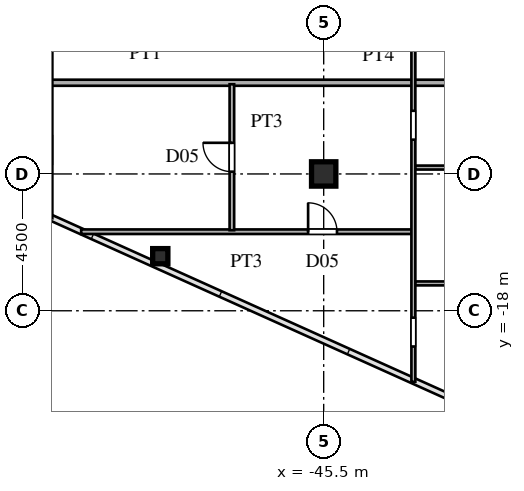
"""IFC4 building model, lengths in metres.
Left out: names, types, materials, properties, quantities, classifications, styles, units other than length and angle.
Written with IfcOpenShell. Run it as: python <this file> out.ifc"""

import sys

from ifc_helpers import new_model, si_unit, direction, frame, frame_2d, origin, origin_2d, place, context, subcontext, project, spatial, rectangle, hollow_rectangle, i_section, extrude, source, transform, mapped, element, fill, save


model = new_model("IFC4")
c1 = context("Model", 3, precision=1e-05, world=origin(), true_north=direction((0.0, 1.0)))
c2 = subcontext(c1, "Body", "Model", "MODEL_VIEW")
j1 = project(units=[si_unit("LENGTHUNIT", "METRE"), si_unit("PLANEANGLEUNIT", "RADIAN")], contexts=[c1])
p1 = place(None, origin())
s1 = spatial("IfcSite", under=j1, at=p1, CompositionType="ELEMENT")
p2 = place(p1, origin())
s2 = spatial("IfcBuilding", under=s1, at=p2, CompositionType="ELEMENT")
p3 = place(p2, frame((0.0, 0.0, 106.8)))
s3 = spatial("IfcBuildingStorey", under=s2, at=p3, CompositionType="ELEMENT", Elevation=106.8)
m1 = source(origin(), c2, "Body", "SweptSolid", [
    extrude(i_section(OverallWidth=0.8, OverallDepth=0.8, WebThickness=0.032, FlangeThickness=0.05, at=origin_2d()), origin(), (0.0, 0.0, 1.0), 3.6),
])
p4 = place(p3, frame((-45.5, -13.5, 0.0), z_axis=(0.0, 0.0, 1.0), x_axis=(1.0, 0.0, 0.0)))
e1 = element("IfcColumn", 1, at=p4, inside=s3, PredefinedType="COLUMN", context=c2, shape_type="MappedRepresentation", body=[
    mapped(m1, transform((0.0, 0.0, 0.0), scale=1.0)),
])
m2 = source(origin(), c2, "Body", "SweptSolid", [
    extrude(hollow_rectangle(XDim=0.5, YDim=0.5, WallThickness=0.02, at=origin_2d()), origin(), (0.0, 0.0, 1.0), 3.6),
])
p5 = place(p3, frame((-50.875, -16.205, 0.0), z_axis=(0.0, 0.0, 1.0), x_axis=(1.0, 0.0, 0.0)))
e2 = element("IfcColumn", 2, at=p5, inside=s3, PredefinedType="COLUMN", context=c2, shape_type="MappedRepresentation", body=[
    mapped(m2, transform((0.0, 0.0, 0.0), scale=1.0)),
])
p6 = place(p3, frame((-42.5, -17.1, 0.0), z_axis=(0.0, 0.0, 1.0), x_axis=(1.0, 0.0, 0.0)))
e3 = element("IfcWall", 3, at=p6, inside=s3, PredefinedType="PARTITIONING", context=c2, shape_type="SweptSolid", body=[
    extrude(rectangle(XDim=4.2, YDim=0.13, at=frame_2d((2.1, 0.0))), origin(), (0.0, 0.0, 1.0), 3.38),
])
p7 = place(p3, frame((-53.477, -15.4, 0.0), z_axis=(0.0, 0.0, 1.0), x_axis=(1.0, 0.0, 0.0)))
e4 = element("IfcWall", 4, at=p7, inside=s3, PredefinedType="PARTITIONING", context=c2, shape_type="SweptSolid", body=[
    extrude(rectangle(XDim=10.877, YDim=0.15, at=frame_2d((5.438, 0.0))), origin(), (0.0, 0.0, 1.0), 3.38),
])
p8 = place(p7, frame((7.465, 0.0, 0.0)))
e5 = element("IfcOpeningElement", 5, at=p8, cuts=e4, PredefinedType="OPENING", context=c2, shape_type="SweptSolid", body=[
    extrude(rectangle(XDim=0.95, YDim=2.15, at=frame_2d((0.475, 1.075))), frame((0.0, 0.085, 0.0), z_axis=(0.0, -1.0, 0.0), x_axis=(1.0, 0.0, 0.0)), (0.0, 0.0, 1.0), 0.17),
])
p9 = place(p3, frame((-42.5, -13.29, 0.0), z_axis=(0.0, 0.0, 1.0), x_axis=(1.0, 0.0, 0.0)))
e6 = element("IfcWall", 6, at=p9, inside=s3, PredefinedType="PARTITIONING", context=c2, shape_type="SweptSolid", body=[
    extrude(rectangle(XDim=4.15, YDim=0.13, at=frame_2d((2.075, 0.0))), origin(), (0.0, 0.0, 1.0), 3.38),
])
p10 = place(p9, frame((1.635, 0.0, 0.0)))
e7 = element("IfcOpeningElement", 7, at=p10, cuts=e6, PredefinedType="OPENING", context=c2, shape_type="SweptSolid", body=[
    extrude(rectangle(XDim=0.88, YDim=2.1, at=frame_2d((0.44, 1.05))), frame((0.0, 0.075, 0.0), z_axis=(0.0, -1.0, 0.0), x_axis=(1.0, 0.0, 0.0)), (0.0, 0.0, 1.0), 0.15),
])
p11 = place(p3, frame((-64.346, -10.5, 0.0), z_axis=(0.0, 0.0, 1.0), x_axis=(1.0, 0.0, 0.0)))
e8 = element("IfcWall", 8, at=p11, inside=s3, PredefinedType="PARTITIONING", context=c2, shape_type="SweptSolid", body=[
    extrude(rectangle(XDim=25.966, YDim=0.2, at=frame_2d((12.983, 0.0))), origin(), (0.0, 0.0, 1.0), 3.38),
])
p12 = place(p3, frame((-54.5, -14.96, 0.0), z_axis=(0.0, 0.0, 1.0), x_axis=(0.0, 1.0, 0.0)))
e9 = element("IfcWall", 9, at=p12, inside=s3, PredefinedType="PARTITIONING", context=c2, shape_type="SweptSolid", body=[
    extrude(rectangle(XDim=29.612, YDim=0.15, at=frame_2d((14.806, 0.0))), origin(), (0.0, 0.0, 1.0), 2.78),
])
p13 = place(p12, frame((1.772, 0.0, 0.0)))
e10 = element("IfcOpeningElement", 10, at=p13, cuts=e9, PredefinedType="OPENING", context=c2, shape_type="SweptSolid", body=[
    extrude(rectangle(XDim=0.95, YDim=2.15, at=frame_2d((0.475, 1.075))), frame((0.0, 0.085, 0.0), z_axis=(0.0, -1.0, 0.0), x_axis=(1.0, 0.0, 0.0)), (0.0, 0.0, 1.0), 0.17),
])
p14 = place(p12, frame((10.985, 0.0, 0.0)))
e11 = element("IfcOpeningElement", 11, at=p14, cuts=e9, PredefinedType="OPENING", context=c2, shape_type="SweptSolid", body=[
    extrude(rectangle(XDim=0.95, YDim=2.15, at=frame_2d((0.475, 1.075))), frame((0.0, 0.085, 0.0), z_axis=(0.0, -1.0, 0.0), x_axis=(1.0, 0.0, 0.0)), (0.0, 0.0, 1.0), 0.17),
])
p15 = place(p12, frame((20.785, 0.0, 0.0)))
e12 = element("IfcOpeningElement", 12, at=p15, cuts=e9, PredefinedType="OPENING", context=c2, shape_type="SweptSolid", body=[
    extrude(rectangle(XDim=0.95, YDim=2.15, at=frame_2d((0.475, 1.075))), frame((0.0, 0.085, 0.0), z_axis=(0.0, -1.0, 0.0), x_axis=(1.0, 0.0, 0.0)), (0.0, 0.0, 1.0), 0.17),
])
p16 = place(p3, frame((-48.52, -15.351, 0.0), z_axis=(0.0, 0.0, 1.0), x_axis=(0.0, 1.0, 0.0)))
e13 = element("IfcWall", 13, at=p16, inside=s3, PredefinedType="PARTITIONING", context=c2, shape_type="SweptSolid", body=[
    extrude(rectangle(XDim=4.801, YDim=0.15, at=frame_2d((2.4, 0.0))), origin(), (0.0, 0.0, 1.0), 3.38),
])
p17 = place(p16, frame((1.925, 0.0, 0.0)))
e14 = element("IfcOpeningElement", 14, at=p17, cuts=e13, PredefinedType="OPENING", context=c2, shape_type="SweptSolid", body=[
    extrude(rectangle(XDim=0.95, YDim=2.15, at=frame_2d((0.475, 1.075))), frame((0.0, 0.085, 0.0), z_axis=(0.0, -1.0, 0.0), x_axis=(1.0, 0.0, 0.0)), (0.0, 0.0, 1.0), 0.17),
])
p18 = place(p3, frame((-42.55, -20.337, 0.0), z_axis=(0.0, 0.0, 1.0), x_axis=(0.0, 1.0, 0.0)))
e15 = element("IfcWall", 15, at=p18, inside=s3, PredefinedType="PARTITIONING", context=c2, shape_type="SweptSolid", body=[
    extrude(rectangle(XDim=19.12, YDim=0.13, at=frame_2d((9.56, 0.0))), origin(), (0.0, 0.0, 1.0), 3.38),
])
p19 = place(p18, frame((7.965, 0.0, 0.0)))
e16 = element("IfcOpeningElement", 16, at=p19, cuts=e15, PredefinedType="OPENING", context=c2, shape_type="SweptSolid", body=[
    extrude(rectangle(XDim=0.95, YDim=2.15, at=frame_2d((0.475, 1.075))), frame((0.0, 0.075, 0.0), z_axis=(0.0, -1.0, 0.0), x_axis=(1.0, 0.0, 0.0)), (0.0, 0.0, 1.0), 0.15),
])
p20 = place(p18, frame((1.161, 0.0, 0.0)))
e17 = element("IfcOpeningElement", 17, at=p20, cuts=e15, PredefinedType="OPENING", context=c2, shape_type="SweptSolid", body=[
    extrude(rectangle(XDim=0.95, YDim=2.15, at=frame_2d((0.475, 1.075))), frame((0.0, 0.075, 0.0), z_axis=(0.0, -1.0, 0.0), x_axis=(1.0, 0.0, 0.0)), (0.0, 0.0, 1.0), 0.15),
])
p21 = place(p18, frame((16.362, 0.0, 0.0)))
e18 = element("IfcOpeningElement", 18, at=p21, cuts=e15, PredefinedType="OPENING", context=c2, shape_type="SweptSolid", body=[
    extrude(rectangle(XDim=0.95, YDim=2.15, at=frame_2d((0.475, 1.075))), frame((0.0, 0.075, 0.0), z_axis=(0.0, -1.0, 0.0), x_axis=(1.0, 0.0, 0.0)), (0.0, 0.0, 1.0), 0.15),
])
m3 = source(origin(), c2, "Body", "SweptSolid", [
    extrude(rectangle(XDim=0.95, YDim=2.15, at=frame_2d((0.475, 1.075))), frame((0.0, 0.025, 0.0), z_axis=(0.0, -1.0, 0.0), x_axis=(1.0, 0.0, 0.0)), (0.0, 0.0, 1.0), 0.05),
])
p22 = place(p8, origin())
e19 = element("IfcDoor", 19, at=p22, inside=s3, OperationType="SINGLE_SWING_LEFT", PredefinedType="DOOR", context=c2, shape_type="MappedRepresentation", body=[
    mapped(m3, transform((0.0, 0.0, 0.0), scale=1.0)),
])
fill(e5, e19)
p23 = place(p17, origin())
e20 = element("IfcDoor", 20, at=p23, inside=s3, OperationType="SINGLE_SWING_RIGHT", PredefinedType="DOOR", context=c2, shape_type="MappedRepresentation", body=[
    mapped(m3, transform((0.0, 0.0, 0.0), scale=1.0)),
])
fill(e14, e20)
save(model, sys.argv[1])
